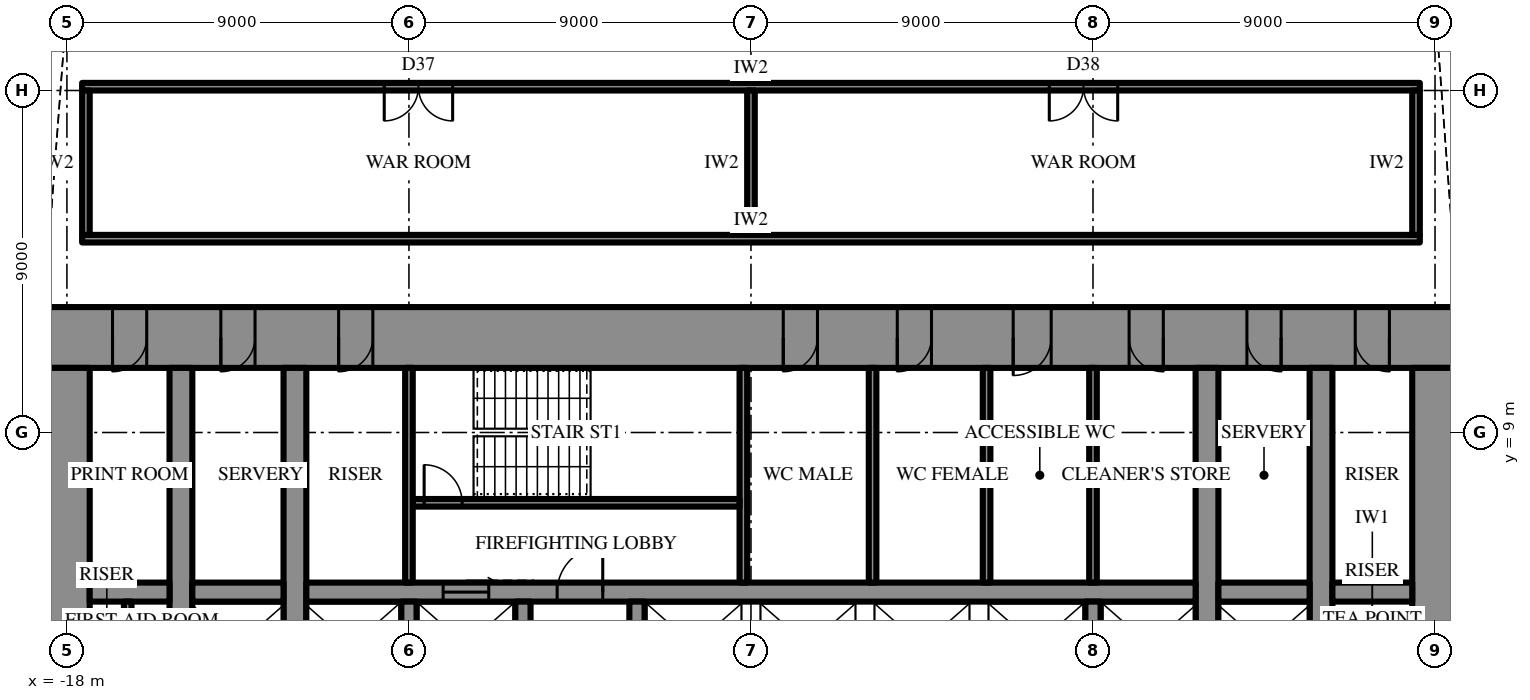
"""IFC4 building model, lengths in metres.
Left out: names, types, materials, properties, quantities, classifications, styles, units other than length and angle.
Written with IfcOpenShell. Run it as: python <this file> out.ifc"""

import sys

from ifc_helpers import new_model, si_unit, direction, frame, frame_2d, origin, place, context, subcontext, project, spatial, rectangle, extrude, element, fill, save


model = new_model("IFC4")
c1 = context("Model", 3, precision=1e-05, world=origin(), true_north=direction((0.0, 1.0)))
c2 = subcontext(c1, "Body", "Model", "MODEL_VIEW")
j1 = project(units=[si_unit("LENGTHUNIT", "METRE"), si_unit("PLANEANGLEUNIT", "RADIAN")], contexts=[c1])
p1 = place(None, origin())
s1 = spatial("IfcSite", under=j1, at=p1, CompositionType="ELEMENT")
p2 = place(p1, origin())
s2 = spatial("IfcBuilding", under=s1, at=p2, CompositionType="ELEMENT")
p3 = place(p2, frame((0.0, 0.0, 157.3)))
s3 = spatial("IfcBuildingStorey", under=s2, at=p3, CompositionType="ELEMENT", Elevation=157.3)
p4 = place(p3, frame((-18.6, 11.5, 0.0), z_axis=(0.0, 0.0, 1.0), x_axis=(1.0, 0.0, 0.0)))
e1 = element("IfcWall", 1, at=p4, inside=s3, PredefinedType="SHEAR", context=c2, shape_type="SweptSolid", body=[
    extrude(rectangle(XDim=37.2, YDim=1.6, at=frame_2d((18.6, 0.0))), origin(), (0.0, 0.0, 1.0), 4.2),
])
p5 = place(p4, frame((19.45, 0.0, 0.0)))
e2 = element("IfcOpeningElement", 2, at=p5, cuts=e1, PredefinedType="OPENING", context=c2, shape_type="SweptSolid", body=[
    extrude(rectangle(XDim=0.9, YDim=2.2, at=frame_2d((0.45, 1.1))), frame((0.0, 0.81, 0.0), z_axis=(0.0, -1.0, 0.0), x_axis=(1.0, 0.0, 0.0)), (0.0, 0.0, 1.0), 1.62),
])
p6 = place(p4, frame((22.45, 0.0, 0.0)))
e3 = element("IfcOpeningElement", 3, at=p6, cuts=e1, PredefinedType="OPENING", context=c2, shape_type="SweptSolid", body=[
    extrude(rectangle(XDim=0.9, YDim=2.2, at=frame_2d((0.45, 1.1))), frame((0.0, 0.81, 0.0), z_axis=(0.0, -1.0, 0.0), x_axis=(1.0, 0.0, 0.0)), (0.0, 0.0, 1.0), 1.62),
])
p7 = place(p4, frame((25.5, 0.0, 0.0)))
e4 = element("IfcOpeningElement", 4, at=p7, cuts=e1, PredefinedType="OPENING", context=c2, shape_type="SweptSolid", body=[
    extrude(rectangle(XDim=1.0, YDim=2.2, at=frame_2d((0.5, 1.1))), frame((0.0, 0.81, 0.0), z_axis=(0.0, -1.0, 0.0), x_axis=(1.0, 0.0, 0.0)), (0.0, 0.0, 1.0), 1.62),
])
p8 = place(p4, frame((1.8, 0.0, 0.0)))
e5 = element("IfcOpeningElement", 5, at=p8, cuts=e1, PredefinedType="OPENING", context=c2, shape_type="SweptSolid", body=[
    extrude(rectangle(XDim=0.9, YDim=2.2, at=frame_2d((0.45, 1.1))), frame((0.0, 0.81, 0.0), z_axis=(0.0, -1.0, 0.0), x_axis=(1.0, 0.0, 0.0)), (0.0, 0.0, 1.0), 1.62),
])
p9 = place(p4, frame((4.65, 0.0, 0.0)))
e6 = element("IfcOpeningElement", 6, at=p9, cuts=e1, PredefinedType="OPENING", context=c2, shape_type="SweptSolid", body=[
    extrude(rectangle(XDim=0.9, YDim=2.2, at=frame_2d((0.45, 1.1))), frame((0.0, 0.81, 0.0), z_axis=(0.0, -1.0, 0.0), x_axis=(1.0, 0.0, 0.0)), (0.0, 0.0, 1.0), 1.62),
])
p10 = place(p4, frame((7.75, 0.0, 0.0)))
e7 = element("IfcOpeningElement", 7, at=p10, cuts=e1, PredefinedType="OPENING", context=c2, shape_type="SweptSolid", body=[
    extrude(rectangle(XDim=0.9, YDim=2.2, at=frame_2d((0.45, 1.1))), frame((0.0, 0.81, 0.0), z_axis=(0.0, -1.0, 0.0), x_axis=(1.0, 0.0, 0.0)), (0.0, 0.0, 1.0), 1.62),
])
p11 = place(p4, frame((28.55, 0.0, 0.0)))
e8 = element("IfcOpeningElement", 8, at=p11, cuts=e1, PredefinedType="OPENING", context=c2, shape_type="SweptSolid", body=[
    extrude(rectangle(XDim=0.9, YDim=2.2, at=frame_2d((0.45, 1.1))), frame((0.0, 0.81, 0.0), z_axis=(0.0, -1.0, 0.0), x_axis=(1.0, 0.0, 0.0)), (0.0, 0.0, 1.0), 1.62),
])
p12 = place(p4, frame((31.65, 0.0, 0.0)))
e9 = element("IfcOpeningElement", 9, at=p12, cuts=e1, PredefinedType="OPENING", context=c2, shape_type="SweptSolid", body=[
    extrude(rectangle(XDim=0.9, YDim=2.2, at=frame_2d((0.45, 1.1))), frame((0.0, 0.81, 0.0), z_axis=(0.0, -1.0, 0.0), x_axis=(1.0, 0.0, 0.0)), (0.0, 0.0, 1.0), 1.62),
])
p13 = place(p4, frame((34.5, 0.0, 0.0)))
e10 = element("IfcOpeningElement", 10, at=p13, cuts=e1, PredefinedType="OPENING", context=c2, shape_type="SweptSolid", body=[
    extrude(rectangle(XDim=0.9, YDim=2.2, at=frame_2d((0.45, 1.1))), frame((0.0, 0.81, 0.0), z_axis=(0.0, -1.0, 0.0), x_axis=(1.0, 0.0, 0.0)), (0.0, 0.0, 1.0), 1.62),
])
p14 = place(p3, frame((18.0, -10.7, 0.0), z_axis=(0.0, 0.0, 1.0), x_axis=(0.0, 1.0, 0.0)))
e11 = element("IfcWall", 11, at=p14, inside=s3, PredefinedType="SHEAR", context=c2, shape_type="SweptSolid", body=[
    extrude(rectangle(XDim=21.4, YDim=1.2, at=frame_2d((10.7, 0.0))), origin(), (0.0, 0.0, 1.0), 4.2),
])
p15 = place(p14, frame((9.8, 0.0, 0.0)))
e12 = element("IfcOpeningElement", 12, at=p15, cuts=e11, PredefinedType="OPENING", context=c2, shape_type="SweptSolid", body=[
    extrude(rectangle(XDim=1.8, YDim=2.4, at=frame_2d((0.9, 1.2))), frame((0.0, 0.61, 0.0), z_axis=(0.0, -1.0, 0.0), x_axis=(1.0, 0.0, 0.0)), (0.0, 0.0, 1.0), 1.22),
])
p16 = place(p3, frame((-18.0, 10.7, 0.0), z_axis=(0.0, 0.0, 1.0), x_axis=(0.0, -1.0, 0.0)))
e13 = element("IfcWall", 13, at=p16, inside=s3, PredefinedType="SHEAR", context=c2, shape_type="SweptSolid", body=[
    extrude(rectangle(XDim=21.4, YDim=1.2, at=frame_2d((10.7, 0.0))), origin(), (0.0, 0.0, 1.0), 4.2),
])
p17 = place(p16, frame((9.8, 0.0, 0.0)))
e14 = element("IfcOpeningElement", 14, at=p17, cuts=e13, PredefinedType="OPENING", context=c2, shape_type="SweptSolid", body=[
    extrude(rectangle(XDim=1.8, YDim=2.4, at=frame_2d((0.9, 1.2))), frame((0.0, 0.61, 0.0), z_axis=(0.0, -1.0, 0.0), x_axis=(1.0, 0.0, 0.0)), (0.0, 0.0, 1.0), 1.22),
])
p18 = place(p3, frame((12.0, -10.7, 0.0), z_axis=(0.0, 0.0, 1.0), x_axis=(0.0, 1.0, 0.0)))
e15 = element("IfcWall", 15, at=p18, inside=s3, PredefinedType="SHEAR", context=c2, shape_type="SweptSolid", body=[
    extrude(rectangle(XDim=21.4, YDim=0.6, at=frame_2d((10.7, 0.0))), origin(), (0.0, 0.0, 1.0), 4.2),
])
p19 = place(p18, frame((9.8, 0.0, 0.0)))
e16 = element("IfcOpeningElement", 16, at=p19, cuts=e15, PredefinedType="OPENING", context=c2, shape_type="SweptSolid", body=[
    extrude(rectangle(XDim=1.8, YDim=2.4, at=frame_2d((0.9, 1.2))), frame((0.0, 0.31, 0.0), z_axis=(0.0, -1.0, 0.0), x_axis=(1.0, 0.0, 0.0)), (0.0, 0.0, 1.0), 0.62),
])
p20 = place(p3, frame((-12.0, -10.7, 0.0), z_axis=(0.0, 0.0, 1.0), x_axis=(0.0, 1.0, 0.0)))
e17 = element("IfcWall", 17, at=p20, inside=s3, PredefinedType="SHEAR", context=c2, shape_type="SweptSolid", body=[
    extrude(rectangle(XDim=21.4, YDim=0.6, at=frame_2d((10.7, 0.0))), origin(), (0.0, 0.0, 1.0), 4.2),
])
p21 = place(p20, frame((9.8, 0.0, 0.0)))
e18 = element("IfcOpeningElement", 18, at=p21, cuts=e17, PredefinedType="OPENING", context=c2, shape_type="SweptSolid", body=[
    extrude(rectangle(XDim=1.8, YDim=2.4, at=frame_2d((0.9, 1.2))), frame((0.0, 0.31, 0.0), z_axis=(0.0, -1.0, 0.0), x_axis=(1.0, 0.0, 0.0)), (0.0, 0.0, 1.0), 0.62),
])
p22 = place(p3, frame((15.0, -10.7, 0.0), z_axis=(0.0, 0.0, 1.0), x_axis=(0.0, 1.0, 0.0)))
e19 = element("IfcWall", 19, at=p22, inside=s3, PredefinedType="SHEAR", context=c2, shape_type="SweptSolid", body=[
    extrude(rectangle(XDim=21.4, YDim=0.6, at=frame_2d((10.7, 0.0))), origin(), (0.0, 0.0, 1.0), 4.2),
])
p23 = place(p22, frame((9.8, 0.0, 0.0)))
e20 = element("IfcOpeningElement", 20, at=p23, cuts=e19, PredefinedType="OPENING", context=c2, shape_type="SweptSolid", body=[
    extrude(rectangle(XDim=1.8, YDim=2.4, at=frame_2d((0.9, 1.2))), frame((0.0, 0.31, 0.0), z_axis=(0.0, -1.0, 0.0), x_axis=(1.0, 0.0, 0.0)), (0.0, 0.0, 1.0), 0.62),
])
p24 = place(p3, frame((-15.0, -10.7, 0.0), z_axis=(0.0, 0.0, 1.0), x_axis=(0.0, 1.0, 0.0)))
e21 = element("IfcWall", 21, at=p24, inside=s3, PredefinedType="SHEAR", context=c2, shape_type="SweptSolid", body=[
    extrude(rectangle(XDim=21.4, YDim=0.6, at=frame_2d((10.7, 0.0))), origin(), (0.0, 0.0, 1.0), 4.2),
])
p25 = place(p24, frame((9.8, 0.0, 0.0)))
e22 = element("IfcOpeningElement", 22, at=p25, cuts=e21, PredefinedType="OPENING", context=c2, shape_type="SweptSolid", body=[
    extrude(rectangle(XDim=1.8, YDim=2.4, at=frame_2d((0.9, 1.2))), frame((0.0, 0.31, 0.0), z_axis=(0.0, -1.0, 0.0), x_axis=(1.0, 0.0, 0.0)), (0.0, 0.0, 1.0), 0.62),
])
p26 = place(p3, frame((-17.4, 4.8, 0.0), z_axis=(0.0, 0.0, 1.0), x_axis=(1.0, 0.0, 0.0)))
e23 = element("IfcWall", 23, at=p26, inside=s3, PredefinedType="SHEAR", context=c2, shape_type="SweptSolid", body=[
    extrude(rectangle(XDim=2.1, YDim=0.5, at=frame_2d((1.05, 0.0))), origin(), (0.0, 0.0, 1.0), 4.2),
])
p27 = place(p3, frame((-14.7, 4.8, 0.0), z_axis=(0.0, 0.0, 1.0), x_axis=(1.0, 0.0, 0.0)))
e24 = element("IfcWall", 24, at=p27, inside=s3, PredefinedType="SHEAR", context=c2, shape_type="SweptSolid", body=[
    extrude(rectangle(XDim=2.4, YDim=0.5, at=frame_2d((1.2, 0.0))), origin(), (0.0, 0.0, 1.0), 4.2),
])
p28 = place(p3, frame((-11.7, 4.8, 0.0), z_axis=(0.0, 0.0, 1.0), x_axis=(1.0, 0.0, 0.0)))
e25 = element("IfcWall", 25, at=p28, inside=s3, PredefinedType="SHEAR", context=c2, shape_type="SweptSolid", body=[
    extrude(rectangle(XDim=23.4, YDim=0.5, at=frame_2d((11.7, 0.0))), origin(), (0.0, 0.0, 1.0), 4.2),
])
p29 = place(p28, frame((6.6, 0.0, 0.0)))
e26 = element("IfcOpeningElement", 26, at=p29, cuts=e25, PredefinedType="OPENING", context=c2, shape_type="SweptSolid", body=[
    extrude(rectangle(XDim=1.2, YDim=2.2, at=frame_2d((0.6, 1.1))), frame((0.0, 0.26, 0.0), z_axis=(0.0, -1.0, 0.0), x_axis=(1.0, 0.0, 0.0)), (0.0, 0.0, 1.0), 0.52),
])
p30 = place(p28, frame((3.6, 0.0, 0.0)))
e27 = element("IfcOpeningElement", 27, at=p30, cuts=e25, PredefinedType="OPENING", context=c2, shape_type="SweptSolid", body=[
    extrude(rectangle(XDim=1.2, YDim=2.2, at=frame_2d((0.6, 1.1))), frame((0.0, 0.26, 0.0), z_axis=(0.0, -1.0, 0.0), x_axis=(1.0, 0.0, 0.0)), (0.0, 0.0, 1.0), 0.52),
])
p31 = place(p3, frame((12.3, 4.8, 0.0), z_axis=(0.0, 0.0, 1.0), x_axis=(1.0, 0.0, 0.0)))
e28 = element("IfcWall", 28, at=p31, inside=s3, PredefinedType="SHEAR", context=c2, shape_type="SweptSolid", body=[
    extrude(rectangle(XDim=2.4, YDim=0.5, at=frame_2d((1.2, 0.0))), origin(), (0.0, 0.0, 1.0), 4.2),
])
p32 = place(p3, frame((15.3, 4.8, 0.0), z_axis=(0.0, 0.0, 1.0), x_axis=(1.0, 0.0, 0.0)))
e29 = element("IfcWall", 29, at=p32, inside=s3, PredefinedType="SHEAR", context=c2, shape_type="SweptSolid", body=[
    extrude(rectangle(XDim=2.1, YDim=0.5, at=frame_2d((1.05, 0.0))), origin(), (0.0, 0.0, 1.0), 4.2),
])
for number, where, z_axis, x_axis in (
    (30, (-9.0, 2.25, 0.0), (0.0, 0.0, 1.0), (0.0, 1.0, 0.0)),
    (31, (-6.0, 2.25, 0.0), (0.0, 0.0, 1.0), (0.0, 1.0, 0.0)),
    (32, (-3.0, 2.25, 0.0), (0.0, 0.0, 1.0), (0.0, 1.0, 0.0)),
    (33, (9.0, 2.25, 0.0), (0.0, 0.0, 1.0), (0.0, 1.0, 0.0)),
):
    element("IfcWall", number, at=place(p3, frame(where, z_axis=z_axis, x_axis=x_axis)), inside=s3, PredefinedType="SHEAR", context=c2, shape_type="SweptSolid", body=[
        extrude(rectangle(XDim=2.3, YDim=0.4, at=frame_2d((1.15, 0.0))), origin(), (0.0, 0.0, 1.0), 4.2),
    ])
p33 = place(p3, frame((-0.2, 5.05, 0.0), z_axis=(0.0, 0.0, 1.0), x_axis=(0.0, 1.0, 0.0)))
e34 = element("IfcWall", 34, at=p33, inside=s3, PredefinedType="SHEAR", context=c2, shape_type="SweptSolid", body=[
    extrude(rectangle(XDim=5.65, YDim=0.2, at=frame_2d((2.825, 0.0))), origin(), (0.0, 0.0, 1.0), 4.2),
])
p34 = place(p3, frame((-8.9, 7.15, 0.0), z_axis=(0.0, 0.0, 1.0), x_axis=(1.0, 0.0, 0.0)))
e35 = element("IfcWall", 35, at=p34, inside=s3, PredefinedType="SHEAR", context=c2, shape_type="SweptSolid", body=[
    extrude(rectangle(XDim=8.6, YDim=0.2, at=frame_2d((4.3, 0.0))), origin(), (0.0, 0.0, 1.0), 4.2),
])
p35 = place(p34, frame((0.3, 0.0, 0.0)))
e36 = element("IfcOpeningElement", 36, at=p35, cuts=e35, PredefinedType="OPENING", context=c2, shape_type="SweptSolid", body=[
    extrude(rectangle(XDim=1.0, YDim=2.2, at=frame_2d((0.5, 1.1))), frame((0.0, 0.11, 0.0), z_axis=(0.0, -1.0, 0.0), x_axis=(1.0, 0.0, 0.0)), (0.0, 0.0, 1.0), 0.22),
])
for number, where, z_axis, x_axis in (
    (37, (-9.0, 5.05, 0.0), (0.0, 0.0, 1.0), (0.0, 1.0, 0.0)),
    (38, (9.0, 5.05, 0.0), (0.0, 0.0, 1.0), (0.0, 1.0, 0.0)),
    (39, (3.2, 5.05, 0.0), (0.0, 0.0, 1.0), (0.0, 1.0, 0.0)),
    (40, (6.2, 5.05, 0.0), (0.0, 0.0, 1.0), (0.0, 1.0, 0.0)),
):
    element("IfcWall", number, at=place(p3, frame(where, z_axis=z_axis, x_axis=x_axis)), inside=s3, PredefinedType="PARTITIONING", context=c2, shape_type="SweptSolid", body=[
        extrude(rectangle(XDim=5.65, YDim=0.2, at=frame_2d((2.825, 0.0))), origin(), (0.0, 0.0, 1.0), 4.0),
    ])
p36 = place(p3, frame((-16.4, 3.55, 0.0), z_axis=(0.0, 0.0, 1.0), x_axis=(0.0, 1.0, 0.0)))
e41 = element("IfcWall", 41, at=p36, inside=s3, PredefinedType="PARTITIONING", context=c2, shape_type="SweptSolid", body=[
    extrude(rectangle(XDim=1.0, YDim=0.2, at=frame_2d((0.5, 0.0))), origin(), (0.0, 0.0, 1.0), 4.0),
])
p37 = place(p3, frame((-17.6, 14.1, 0.0), z_axis=(0.0, 0.0, 1.0), x_axis=(1.0, 0.0, 0.0)))
e42 = element("IfcWall", 42, at=p37, inside=s3, PredefinedType="PARTITIONING", context=c2, shape_type="SweptSolid", body=[
    extrude(rectangle(XDim=35.2, YDim=0.2, at=frame_2d((17.6, 0.0))), origin(), (0.0, 0.0, 1.0), 4.0),
])
p38 = place(p3, frame((-17.6, 18.1, 0.0), z_axis=(0.0, 0.0, 1.0), x_axis=(1.0, 0.0, 0.0)))
e43 = element("IfcWall", 43, at=p38, inside=s3, PredefinedType="PARTITIONING", context=c2, shape_type="SweptSolid", body=[
    extrude(rectangle(XDim=35.2, YDim=0.2, at=frame_2d((17.6, 0.0))), origin(), (0.0, 0.0, 1.0), 4.0),
])
p39 = place(p38, frame((7.95, 0.0, 0.0)))
e44 = element("IfcOpeningElement", 44, at=p39, cuts=e43, PredefinedType="OPENING", context=c2, shape_type="SweptSolid", body=[
    extrude(rectangle(XDim=1.8, YDim=2.4, at=frame_2d((0.9, 1.2))), frame((0.0, 0.11, 0.0), z_axis=(0.0, -1.0, 0.0), x_axis=(1.0, 0.0, 0.0)), (0.0, 0.0, 1.0), 0.22),
])
p40 = place(p38, frame((25.45, 0.0, 0.0)))
e45 = element("IfcOpeningElement", 45, at=p40, cuts=e43, PredefinedType="OPENING", context=c2, shape_type="SweptSolid", body=[
    extrude(rectangle(XDim=1.8, YDim=2.4, at=frame_2d((0.9, 1.2))), frame((0.0, 0.11, 0.0), z_axis=(0.0, -1.0, 0.0), x_axis=(1.0, 0.0, 0.0)), (0.0, 0.0, 1.0), 0.22),
])
p41 = place(p3, frame((-17.5, 14.2, 0.0), z_axis=(0.0, 0.0, 1.0), x_axis=(0.0, 1.0, 0.0)))
e46 = element("IfcWall", 46, at=p41, inside=s3, PredefinedType="PARTITIONING", context=c2, shape_type="SweptSolid", body=[
    extrude(rectangle(XDim=3.8, YDim=0.2, at=frame_2d((1.9, 0.0))), origin(), (0.0, 0.0, 1.0), 4.0),
])
p42 = place(p3, frame((0.0, 14.2, 0.0), z_axis=(0.0, 0.0, 1.0), x_axis=(0.0, 1.0, 0.0)))
e47 = element("IfcWall", 47, at=p42, inside=s3, PredefinedType="PARTITIONING", context=c2, shape_type="SweptSolid", body=[
    extrude(rectangle(XDim=3.8, YDim=0.2, at=frame_2d((1.9, 0.0))), origin(), (0.0, 0.0, 1.0), 2.992),
])
p43 = place(p3, frame((17.5, 14.2, 0.0), z_axis=(0.0, 0.0, 1.0), x_axis=(0.0, 1.0, 0.0)))
e48 = element("IfcWall", 48, at=p43, inside=s3, PredefinedType="PARTITIONING", context=c2, shape_type="SweptSolid", body=[
    extrude(rectangle(XDim=3.8, YDim=0.2, at=frame_2d((1.9, 0.0))), origin(), (0.0, 0.0, 1.0), 4.0),
])
p44 = place(p29, origin())
e49 = element("IfcDoor", 49, at=p44, inside=s3, OperationType="SINGLE_SWING_LEFT", PredefinedType="DOOR", context=c2, shape_type="SweptSolid", body=[
    extrude(rectangle(XDim=1.2, YDim=2.2, at=frame_2d((0.6, 1.1))), frame((0.0, 0.025, 0.0), z_axis=(0.0, -1.0, 0.0), x_axis=(1.0, 0.0, 0.0)), (0.0, 0.0, 1.0), 0.05),
])
fill(e26, e49)
p45 = place(p35, origin())
e50 = element("IfcDoor", 50, at=p45, inside=s3, OperationType="SINGLE_SWING_RIGHT", PredefinedType="DOOR", context=c2, shape_type="SweptSolid", body=[
    extrude(rectangle(XDim=1.0, YDim=2.2, at=frame_2d((0.5, 1.1))), frame((0.0, 0.025, 0.0), z_axis=(0.0, -1.0, 0.0), x_axis=(1.0, 0.0, 0.0)), (0.0, 0.0, 1.0), 0.05),
])
fill(e36, e50)
p46 = place(p5, frame((0.9, 0.0, 0.0), z_axis=(0.0, 0.0, 1.0), x_axis=(-1.0, 0.0, 0.0)))
e51 = element("IfcDoor", 51, at=p46, inside=s3, OperationType="SINGLE_SWING_LEFT", PredefinedType="DOOR", context=c2, shape_type="SweptSolid", body=[
    extrude(rectangle(XDim=0.9, YDim=2.2, at=frame_2d((0.45, 1.1))), frame((0.0, 0.025, 0.0), z_axis=(0.0, -1.0, 0.0), x_axis=(1.0, 0.0, 0.0)), (0.0, 0.0, 1.0), 0.05),
])
fill(e2, e51)
p47 = place(p6, frame((0.9, 0.0, 0.0), z_axis=(0.0, 0.0, 1.0), x_axis=(-1.0, 0.0, 0.0)))
e52 = element("IfcDoor", 52, at=p47, inside=s3, OperationType="SINGLE_SWING_LEFT", PredefinedType="DOOR", context=c2, shape_type="SweptSolid", body=[
    extrude(rectangle(XDim=0.9, YDim=2.2, at=frame_2d((0.45, 1.1))), frame((0.0, 0.025, 0.0), z_axis=(0.0, -1.0, 0.0), x_axis=(1.0, 0.0, 0.0)), (0.0, 0.0, 1.0), 0.05),
])
fill(e3, e52)
p48 = place(p7, frame((1.0, 0.0, 0.0), z_axis=(0.0, 0.0, 1.0), x_axis=(-1.0, 0.0, 0.0)))
e53 = element("IfcDoor", 53, at=p48, inside=s3, OperationType="SINGLE_SWING_LEFT", PredefinedType="DOOR", context=c2, shape_type="SweptSolid", body=[
    extrude(rectangle(XDim=1.0, YDim=2.2, at=frame_2d((0.5, 1.1))), frame((0.0, 0.025, 0.0), z_axis=(0.0, -1.0, 0.0), x_axis=(1.0, 0.0, 0.0)), (0.0, 0.0, 1.0), 0.05),
])
fill(e4, e53)
p49 = place(p8, frame((0.9, 0.0, 0.0), z_axis=(0.0, 0.0, 1.0), x_axis=(-1.0, 0.0, 0.0)))
e54 = element("IfcDoor", 54, at=p49, inside=s3, OperationType="SINGLE_SWING_LEFT", PredefinedType="DOOR", context=c2, shape_type="SweptSolid", body=[
    extrude(rectangle(XDim=0.9, YDim=2.2, at=frame_2d((0.45, 1.1))), frame((0.0, 0.025, 0.0), z_axis=(0.0, -1.0, 0.0), x_axis=(1.0, 0.0, 0.0)), (0.0, 0.0, 1.0), 0.05),
])
fill(e5, e54)
p50 = place(p9, frame((0.9, 0.0, 0.0), z_axis=(0.0, 0.0, 1.0), x_axis=(-1.0, 0.0, 0.0)))
e55 = element("IfcDoor", 55, at=p50, inside=s3, OperationType="SINGLE_SWING_LEFT", PredefinedType="DOOR", context=c2, shape_type="SweptSolid", body=[
    extrude(rectangle(XDim=0.9, YDim=2.2, at=frame_2d((0.45, 1.1))), frame((0.0, 0.025, 0.0), z_axis=(0.0, -1.0, 0.0), x_axis=(1.0, 0.0, 0.0)), (0.0, 0.0, 1.0), 0.05),
])
fill(e6, e55)
p51 = place(p10, frame((0.9, 0.0, 0.0), z_axis=(0.0, 0.0, 1.0), x_axis=(-1.0, 0.0, 0.0)))
e56 = element("IfcDoor", 56, at=p51, inside=s3, OperationType="SINGLE_SWING_LEFT", PredefinedType="DOOR", context=c2, shape_type="SweptSolid", body=[
    extrude(rectangle(XDim=0.9, YDim=2.2, at=frame_2d((0.45, 1.1))), frame((0.0, 0.025, 0.0), z_axis=(0.0, -1.0, 0.0), x_axis=(1.0, 0.0, 0.0)), (0.0, 0.0, 1.0), 0.05),
])
fill(e7, e56)
p52 = place(p11, frame((0.9, 0.0, 0.0), z_axis=(0.0, 0.0, 1.0), x_axis=(-1.0, 0.0, 0.0)))
e57 = element("IfcDoor", 57, at=p52, inside=s3, OperationType="SINGLE_SWING_RIGHT", PredefinedType="DOOR", context=c2, shape_type="SweptSolid", body=[
    extrude(rectangle(XDim=0.9, YDim=2.2, at=frame_2d((0.45, 1.1))), frame((0.0, 0.025, 0.0), z_axis=(0.0, -1.0, 0.0), x_axis=(1.0, 0.0, 0.0)), (0.0, 0.0, 1.0), 0.05),
])
fill(e8, e57)
p53 = place(p12, frame((0.9, 0.0, 0.0), z_axis=(0.0, 0.0, 1.0), x_axis=(-1.0, 0.0, 0.0)))
e58 = element("IfcDoor", 58, at=p53, inside=s3, OperationType="SINGLE_SWING_RIGHT", PredefinedType="DOOR", context=c2, shape_type="SweptSolid", body=[
    extrude(rectangle(XDim=0.9, YDim=2.2, at=frame_2d((0.45, 1.1))), frame((0.0, 0.025, 0.0), z_axis=(0.0, -1.0, 0.0), x_axis=(1.0, 0.0, 0.0)), (0.0, 0.0, 1.0), 0.05),
])
fill(e9, e58)
p54 = place(p13, frame((0.9, 0.0, 0.0), z_axis=(0.0, 0.0, 1.0), x_axis=(-1.0, 0.0, 0.0)))
e59 = element("IfcDoor", 59, at=p54, inside=s3, OperationType="SINGLE_SWING_RIGHT", PredefinedType="DOOR", context=c2, shape_type="SweptSolid", body=[
    extrude(rectangle(XDim=0.9, YDim=2.2, at=frame_2d((0.45, 1.1))), frame((0.0, 0.025, 0.0), z_axis=(0.0, -1.0, 0.0), x_axis=(1.0, 0.0, 0.0)), (0.0, 0.0, 1.0), 0.05),
])
fill(e10, e59)
p55 = place(p30, origin())
e60 = element("IfcDoor", 60, at=p55, inside=s3, OperationType="SLIDING_TO_LEFT", PredefinedType="DOOR", context=c2, shape_type="SweptSolid", body=[
    extrude(rectangle(XDim=1.2, YDim=2.2, at=frame_2d((0.6, 1.1))), frame((0.0, 0.025, 0.0), z_axis=(0.0, -1.0, 0.0), x_axis=(1.0, 0.0, 0.0)), (0.0, 0.0, 1.0), 0.05),
])
fill(e27, e60)
p56 = place(p39, frame((1.8, 0.0, 0.0), z_axis=(0.0, 0.0, 1.0), x_axis=(-1.0, 0.0, 0.0)))
e61 = element("IfcDoor", 61, at=p56, inside=s3, OperationType="DOUBLE_DOOR_SINGLE_SWING", PredefinedType="DOOR", context=c2, shape_type="SweptSolid", body=[
    extrude(rectangle(XDim=1.8, YDim=2.4, at=frame_2d((0.9, 1.2))), frame((0.0, 0.025, 0.0), z_axis=(0.0, -1.0, 0.0), x_axis=(1.0, 0.0, 0.0)), (0.0, 0.0, 1.0), 0.05),
])
fill(e44, e61)
p57 = place(p40, frame((1.8, 0.0, 0.0), z_axis=(0.0, 0.0, 1.0), x_axis=(-1.0, 0.0, 0.0)))
e62 = element("IfcDoor", 62, at=p57, inside=s3, OperationType="DOUBLE_DOOR_SINGLE_SWING", PredefinedType="DOOR", context=c2, shape_type="SweptSolid", body=[
    extrude(rectangle(XDim=1.8, YDim=2.4, at=frame_2d((0.9, 1.2))), frame((0.0, 0.025, 0.0), z_axis=(0.0, -1.0, 0.0), x_axis=(1.0, 0.0, 0.0)), (0.0, 0.0, 1.0), 0.05),
])
fill(e45, e62)
save(model, sys.argv[1])
